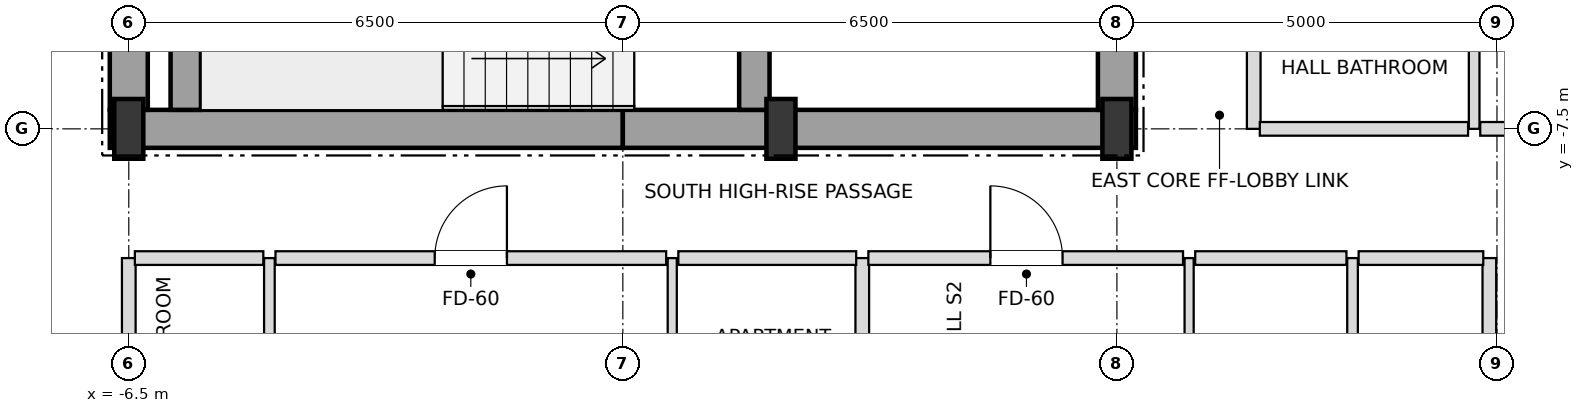
"""IFC4 building model, lengths in metres.
Left out: names, types, materials, properties, quantities, classifications, styles, units other than length and angle.
Written with IfcOpenShell. Run it as: python <this file> out.ifc"""

import sys

from ifc_helpers import new_model, si_unit, direction, frame, frame_2d, origin, origin_2d, place, context, subcontext, project, spatial, rectangle, i_section, extrude, element, fill, save


model = new_model("IFC4")
c1 = context("Model", 3, precision=1e-05, world=origin(), true_north=direction((0.0, 1.0)))
c2 = subcontext(c1, "Body", "Model", "MODEL_VIEW")
j1 = project(units=[si_unit("LENGTHUNIT", "METRE"), si_unit("PLANEANGLEUNIT", "RADIAN")], contexts=[c1])
p1 = place(None, origin())
s1 = spatial("IfcSite", under=j1, at=p1, CompositionType="ELEMENT")
p2 = place(p1, origin())
s2 = spatial("IfcBuilding", under=s1, at=p2, CompositionType="ELEMENT")
p3 = place(p2, frame((0.0, 0.0, 233.1)))
s3 = spatial("IfcBuildingStorey", under=s2, at=p3, CompositionType="ELEMENT", Elevation=233.1)
for number, where, z_axis, x_axis in (
    (1, (-6.5, -7.5, 0.0), (0.0, 0.0, 1.0), (1.0, 0.0, 0.0)),
    (2, (2.08, -7.5, 0.0), (0.0, 0.0, 1.0), (1.0, 0.0, 0.0)),
    (3, (6.5, -7.5, 0.0), (0.0, 0.0, 1.0), (1.0, 0.0, 0.0)),
):
    element("IfcColumn", number, at=place(p3, frame(where, z_axis=z_axis, x_axis=x_axis)), inside=s3, PredefinedType="COLUMN", context=c2, shape_type="SweptSolid", body=[
        extrude(i_section(OverallWidth=0.382, OverallDepth=0.786, WebThickness=0.02, FlangeThickness=0.033, at=origin_2d()), origin(), (0.0, 0.0, 1.0), 3.6),
    ])
for number, where, z_axis, x_axis in (
    (4, (-6.75, -7.5, 0.0), (0.0, 0.0, 1.0), (1.0, 0.0, 0.0)),
    (5, (0.0, -7.5, 0.0), (0.0, 0.0, 1.0), (1.0, 0.0, 0.0)),
):
    element("IfcWall", number, at=place(p3, frame(where, z_axis=z_axis, x_axis=x_axis)), inside=s3, PredefinedType="SHEAR", context=c2, shape_type="SweptSolid", body=[
        extrude(rectangle(XDim=6.75, YDim=0.5, at=frame_2d((3.375, 0.0))), origin(), (0.0, 0.0, 1.0), 3.38),
    ])
p4 = place(p3, frame((-6.5, -7.25, 0.0), z_axis=(0.0, 0.0, 1.0), x_axis=(0.0, 1.0, 0.0)))
e6 = element("IfcWall", 6, at=p4, inside=s3, PredefinedType="SHEAR", context=c2, shape_type="SweptSolid", body=[
    extrude(rectangle(XDim=3.55, YDim=0.5, at=frame_2d((1.775, 0.0))), origin(), (0.0, 0.0, 1.0), 3.38),
])
p5 = place(p3, frame((6.5, -7.25, 0.0), z_axis=(0.0, 0.0, 1.0), x_axis=(0.0, 1.0, 0.0)))
e7 = element("IfcWall", 7, at=p5, inside=s3, PredefinedType="SHEAR", context=c2, shape_type="SweptSolid", body=[
    extrude(rectangle(XDim=5.75, YDim=0.5, at=frame_2d((2.875, 0.0))), origin(), (0.0, 0.0, 1.0), 3.38),
])
p6 = place(p5, frame((0.85, 0.0, 0.0)))
e8 = element("IfcOpeningElement", 8, at=p6, cuts=e7, PredefinedType="OPENING", context=c2, shape_type="SweptSolid", body=[
    extrude(rectangle(XDim=1.05, YDim=2.15, at=frame_2d((0.525, 1.075))), frame((0.0, 0.26, 0.0), z_axis=(0.0, -1.0, 0.0), x_axis=(1.0, 0.0, 0.0)), (0.0, 0.0, 1.0), 0.52),
])
p7 = place(p3, frame((-5.75, -7.25, 0.0), z_axis=(0.0, 0.0, 1.0), x_axis=(0.0, 1.0, 0.0)))
e9 = element("IfcWall", 9, at=p7, inside=s3, PredefinedType="SHEAR", context=c2, shape_type="SweptSolid", body=[
    extrude(rectangle(XDim=2.9, YDim=0.4, at=frame_2d((1.45, 0.0))), origin(), (0.0, 0.0, 1.0), 3.38),
])
p8 = place(p3, frame((1.73, -7.25, 0.0), z_axis=(0.0, 0.0, 1.0), x_axis=(0.0, 1.0, 0.0)))
e10 = element("IfcWall", 10, at=p8, inside=s3, PredefinedType="SHEAR", context=c2, shape_type="SweptSolid", body=[
    extrude(rectangle(XDim=3.3, YDim=0.4, at=frame_2d((1.65, 0.0))), origin(), (0.0, 0.0, 1.0), 3.38),
])
p9 = place(p8, frame((0.9, 0.0, 0.0)))
e11 = element("IfcOpeningElement", 11, at=p9, cuts=e10, PredefinedType="OPENING", context=c2, shape_type="SweptSolid", body=[
    extrude(rectangle(XDim=1.05, YDim=2.15, at=frame_2d((0.525, 1.075))), frame((0.0, 0.21, 0.0), z_axis=(0.0, -1.0, 0.0), x_axis=(1.0, 0.0, 0.0)), (0.0, 0.0, 1.0), 0.42),
])
p10 = place(p3, frame((-6.5, -19.9, 0.0), z_axis=(0.0, 0.0, 1.0), x_axis=(0.0, 1.0, 0.0)))
e12 = element("IfcWall", 12, at=p10, inside=s3, PredefinedType="PARTITIONING", context=c2, shape_type="SweptSolid", body=[
    extrude(rectangle(XDim=10.7, YDim=0.18, at=frame_2d((5.35, 0.0))), origin(), (0.0, 0.0, 1.0), 2.826),
])
p11 = place(p3, frame((-4.65, -13.9, 0.0), z_axis=(0.0, 0.0, 1.0), x_axis=(0.0, 1.0, 0.0)))
e13 = element("IfcWall", 13, at=p11, inside=s3, PredefinedType="PARTITIONING", context=c2, shape_type="SweptSolid", body=[
    extrude(rectangle(XDim=4.7, YDim=0.14, at=frame_2d((2.35, 0.0))), origin(), (0.0, 0.0, 1.0), 3.38),
])
p12 = place(p11, frame((1.9, 0.0, 0.0)))
e14 = element("IfcOpeningElement", 14, at=p12, cuts=e13, PredefinedType="OPENING", context=c2, shape_type="SweptSolid", body=[
    extrude(rectangle(XDim=0.9, YDim=2.1, at=frame_2d((0.45, 1.05))), frame((0.0, 0.08, 0.0), z_axis=(0.0, -1.0, 0.0), x_axis=(1.0, 0.0, 0.0)), (0.0, 0.0, 1.0), 0.16),
])
p13 = place(p3, frame((0.65, -13.9, 0.0), z_axis=(0.0, 0.0, 1.0), x_axis=(0.0, 1.0, 0.0)))
e15 = element("IfcWall", 15, at=p13, inside=s3, PredefinedType="PARTITIONING", context=c2, shape_type="SweptSolid", body=[
    extrude(rectangle(XDim=4.7, YDim=0.12, at=frame_2d((2.35, 0.0))), origin(), (0.0, 0.0, 1.0), 3.38),
])
p14 = place(p13, frame((1.875, 0.0, 0.0)))
e16 = element("IfcOpeningElement", 16, at=p14, cuts=e15, PredefinedType="OPENING", context=c2, shape_type="SweptSolid", body=[
    extrude(rectangle(XDim=0.95, YDim=2.1, at=frame_2d((0.475, 1.05))), frame((0.0, 0.07, 0.0), z_axis=(0.0, -1.0, 0.0), x_axis=(1.0, 0.0, 0.0)), (0.0, 0.0, 1.0), 0.14),
])
p15 = place(p3, frame((3.15, -19.9, 0.0), z_axis=(0.0, 0.0, 1.0), x_axis=(0.0, 1.0, 0.0)))
e17 = element("IfcWall", 17, at=p15, inside=s3, PredefinedType="PARTITIONING", context=c2, shape_type="SweptSolid", body=[
    extrude(rectangle(XDim=10.7, YDim=0.18, at=frame_2d((5.35, 0.0))), origin(), (0.0, 0.0, 1.0), 3.018),
])
p16 = place(p3, frame((7.45, -19.9, 0.0), z_axis=(0.0, 0.0, 1.0), x_axis=(0.0, 1.0, 0.0)))
e18 = element("IfcWall", 18, at=p16, inside=s3, PredefinedType="PARTITIONING", context=c2, shape_type="SweptSolid", body=[
    extrude(rectangle(XDim=10.7, YDim=0.12, at=frame_2d((5.35, 0.0))), origin(), (0.0, 0.0, 1.0), 2.826),
])
p17 = place(p16, frame((7.875, 0.0, 0.0)))
e19 = element("IfcOpeningElement", 19, at=p17, cuts=e18, PredefinedType="OPENING", context=c2, shape_type="SweptSolid", body=[
    extrude(rectangle(XDim=0.95, YDim=2.1, at=frame_2d((0.475, 1.05))), frame((0.0, 0.07, 0.0), z_axis=(0.0, -1.0, 0.0), x_axis=(1.0, 0.0, 0.0)), (0.0, 0.0, 1.0), 0.14),
])
p18 = place(p16, frame((2.55, 0.0, 0.0)))
e20 = element("IfcOpeningElement", 20, at=p18, cuts=e18, PredefinedType="OPENING", context=c2, shape_type="SweptSolid", body=[
    extrude(rectangle(XDim=0.9, YDim=2.1, at=frame_2d((0.45, 1.05))), frame((0.0, 0.07, 0.0), z_axis=(0.0, -1.0, 0.0), x_axis=(1.0, 0.0, 0.0)), (0.0, 0.0, 1.0), 0.14),
])
p19 = place(p3, frame((8.3, -7.5, 0.0), z_axis=(0.0, 0.0, 1.0), x_axis=(0.0, 1.0, 0.0)))
e21 = element("IfcWall", 21, at=p19, inside=s3, PredefinedType="PARTITIONING", context=c2, shape_type="SweptSolid", body=[
    extrude(rectangle(XDim=15.0, YDim=0.18, at=frame_2d((7.5, 0.0))), origin(), (0.0, 0.0, 1.0), 3.38),
])
p20 = place(p19, frame((2.355, 0.0, 0.0)))
e22 = element("IfcOpeningElement", 22, at=p20, cuts=e21, PredefinedType="OPENING", context=c2, shape_type="SweptSolid", body=[
    extrude(rectangle(XDim=0.95, YDim=2.15, at=frame_2d((0.475, 1.075))), frame((0.0, 0.1, 0.0), z_axis=(0.0, -1.0, 0.0), x_axis=(1.0, 0.0, 0.0)), (0.0, 0.0, 1.0), 0.2),
])
p21 = place(p3, frame((9.6, -13.9, 0.0), z_axis=(0.0, 0.0, 1.0), x_axis=(0.0, 1.0, 0.0)))
e23 = element("IfcWall", 23, at=p21, inside=s3, PredefinedType="PARTITIONING", context=c2, shape_type="SweptSolid", body=[
    extrude(rectangle(XDim=4.7, YDim=0.14, at=frame_2d((2.35, 0.0))), origin(), (0.0, 0.0, 1.0), 2.826),
])
p22 = place(p21, frame((1.9, 0.0, 0.0)))
e24 = element("IfcOpeningElement", 24, at=p22, cuts=e23, PredefinedType="OPENING", context=c2, shape_type="SweptSolid", body=[
    extrude(rectangle(XDim=0.9, YDim=2.1, at=frame_2d((0.45, 1.05))), frame((0.0, 0.08, 0.0), z_axis=(0.0, -1.0, 0.0), x_axis=(1.0, 0.0, 0.0)), (0.0, 0.0, 1.0), 0.16),
])
p23 = place(p3, frame((11.2, -7.5, 0.0), z_axis=(0.0, 0.0, 1.0), x_axis=(0.0, 1.0, 0.0)))
e25 = element("IfcWall", 25, at=p23, inside=s3, PredefinedType="PARTITIONING", context=c2, shape_type="SweptSolid", body=[
    extrude(rectangle(XDim=15.0, YDim=0.14, at=frame_2d((7.5, 0.0))), origin(), (0.0, 0.0, 1.0), 3.38),
])
p24 = place(p23, frame((3.475, 0.0, 0.0)))
e26 = element("IfcOpeningElement", 26, at=p24, cuts=e25, PredefinedType="OPENING", context=c2, shape_type="SweptSolid", body=[
    extrude(rectangle(XDim=0.95, YDim=2.1, at=frame_2d((0.475, 1.05))), frame((0.0, 0.08, 0.0), z_axis=(0.0, -1.0, 0.0), x_axis=(1.0, 0.0, 0.0)), (0.0, 0.0, 1.0), 0.16),
])
p25 = place(p3, frame((11.4, -14.27, 0.0), z_axis=(0.0, 0.0, 1.0), x_axis=(0.0, 1.0, 0.0)))
e27 = element("IfcWall", 27, at=p25, inside=s3, PredefinedType="PARTITIONING", context=c2, shape_type="SweptSolid", body=[
    extrude(rectangle(XDim=5.07, YDim=0.18, at=frame_2d((2.535, 0.0))), origin(), (0.0, 0.0, 1.0), 2.748),
])
p26 = place(p3, frame((-6.42, -9.2, 0.0), z_axis=(0.0, 0.0, 1.0), x_axis=(1.0, 0.0, 0.0)))
e28 = element("IfcWall", 28, at=p26, inside=s3, PredefinedType="PARTITIONING", context=c2, shape_type="SweptSolid", body=[
    extrude(rectangle(XDim=1.69, YDim=0.18, at=frame_2d((0.845, 0.0))), origin(), (0.0, 0.0, 1.0), 3.38),
])
p27 = place(p3, frame((-4.57, -9.2, 0.0), z_axis=(0.0, 0.0, 1.0), x_axis=(1.0, 0.0, 0.0)))
e29 = element("IfcWall", 29, at=p27, inside=s3, PredefinedType="PARTITIONING", context=c2, shape_type="SweptSolid", body=[
    extrude(rectangle(XDim=5.14, YDim=0.18, at=frame_2d((2.57, 0.0))), origin(), (0.0, 0.0, 1.0), 3.38),
])
p28 = place(p27, frame((2.095, 0.0, 0.0)))
e30 = element("IfcOpeningElement", 30, at=p28, cuts=e29, PredefinedType="OPENING", context=c2, shape_type="SweptSolid", body=[
    extrude(rectangle(XDim=0.95, YDim=2.15, at=frame_2d((0.475, 1.075))), frame((0.0, 0.1, 0.0), z_axis=(0.0, -1.0, 0.0), x_axis=(1.0, 0.0, 0.0)), (0.0, 0.0, 1.0), 0.2),
])
p29 = place(p3, frame((0.73, -9.2, 0.0), z_axis=(0.0, 0.0, 1.0), x_axis=(1.0, 0.0, 0.0)))
e31 = element("IfcWall", 31, at=p29, inside=s3, PredefinedType="PARTITIONING", context=c2, shape_type="SweptSolid", body=[
    extrude(rectangle(XDim=2.34, YDim=0.18, at=frame_2d((1.17, 0.0))), origin(), (0.0, 0.0, 1.0), 3.38),
])
p30 = place(p3, frame((3.23, -9.2, 0.0), z_axis=(0.0, 0.0, 1.0), x_axis=(1.0, 0.0, 0.0)))
e32 = element("IfcWall", 32, at=p30, inside=s3, PredefinedType="PARTITIONING", context=c2, shape_type="SweptSolid", body=[
    extrude(rectangle(XDim=4.14, YDim=0.18, at=frame_2d((2.07, 0.0))), origin(), (0.0, 0.0, 1.0), 2.826),
])
p31 = place(p30, frame((1.605, 0.0, 0.0)))
e33 = element("IfcOpeningElement", 33, at=p31, cuts=e32, PredefinedType="OPENING", context=c2, shape_type="SweptSolid", body=[
    extrude(rectangle(XDim=0.95, YDim=2.15, at=frame_2d((0.475, 1.075))), frame((0.0, 0.1, 0.0), z_axis=(0.0, -1.0, 0.0), x_axis=(1.0, 0.0, 0.0)), (0.0, 0.0, 1.0), 0.2),
])
p32 = place(p3, frame((7.53, -9.2, 0.0), z_axis=(0.0, 0.0, 1.0), x_axis=(1.0, 0.0, 0.0)))
e34 = element("IfcWall", 34, at=p32, inside=s3, PredefinedType="PARTITIONING", context=c2, shape_type="SweptSolid", body=[
    extrude(rectangle(XDim=1.99, YDim=0.18, at=frame_2d((0.995, 0.0))), origin(), (0.0, 0.0, 1.0), 3.38),
])
p33 = place(p3, frame((9.68, -9.2, 0.0), z_axis=(0.0, 0.0, 1.0), x_axis=(1.0, 0.0, 0.0)))
e35 = element("IfcWall", 35, at=p33, inside=s3, PredefinedType="PARTITIONING", context=c2, shape_type="SweptSolid", body=[
    extrude(rectangle(XDim=1.64, YDim=0.18, at=frame_2d((0.82, 0.0))), origin(), (0.0, 0.0, 1.0), 3.38),
])
p34 = place(p3, frame((8.38, -7.5, 0.0), z_axis=(0.0, 0.0, 1.0), x_axis=(1.0, 0.0, 0.0)))
e36 = element("IfcWall", 36, at=p34, inside=s3, PredefinedType="PARTITIONING", context=c2, shape_type="SweptSolid", body=[
    extrude(rectangle(XDim=2.74, YDim=0.18, at=frame_2d((1.37, 0.0))), origin(), (0.0, 0.0, 1.0), 2.826),
])
p35 = place(p3, frame((11.28, -7.5, 0.0), z_axis=(0.0, 0.0, 1.0), x_axis=(1.0, 0.0, 0.0)))
e37 = element("IfcWall", 37, at=p35, inside=s3, PredefinedType="PARTITIONING", context=c2, shape_type="SweptSolid", body=[
    extrude(rectangle(XDim=5.62, YDim=0.18, at=frame_2d((2.81, 0.0))), origin(), (0.0, 0.0, 1.0), 2.826),
])
p36 = place(p28, origin())
e38 = element("IfcDoor", 38, at=p36, inside=s3, OperationType="SINGLE_SWING_RIGHT", PredefinedType="DOOR", context=c2, shape_type="SweptSolid", body=[
    extrude(rectangle(XDim=0.95, YDim=2.15, at=frame_2d((0.475, 1.075))), frame((0.0, 0.025, 0.0), z_axis=(0.0, -1.0, 0.0), x_axis=(1.0, 0.0, 0.0)), (0.0, 0.0, 1.0), 0.05),
])
fill(e30, e38)
p37 = place(p31, origin())
e39 = element("IfcDoor", 39, at=p37, inside=s3, OperationType="SINGLE_SWING_LEFT", PredefinedType="DOOR", context=c2, shape_type="SweptSolid", body=[
    extrude(rectangle(XDim=0.95, YDim=2.15, at=frame_2d((0.475, 1.075))), frame((0.0, 0.025, 0.0), z_axis=(0.0, -1.0, 0.0), x_axis=(1.0, 0.0, 0.0)), (0.0, 0.0, 1.0), 0.05),
])
fill(e33, e39)
save(model, sys.argv[1])
